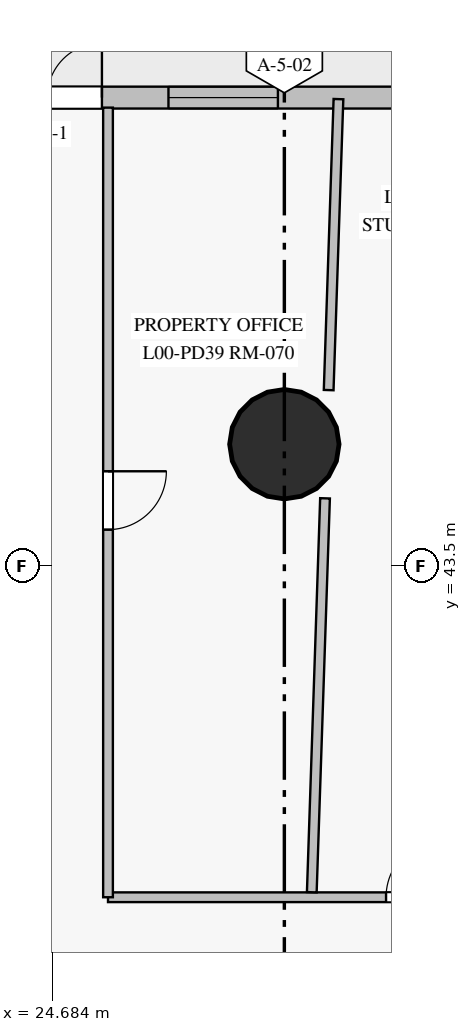
"""IFC4 building model, lengths in metres.
Left out: names, types, materials, properties, quantities, classifications, styles, units other than length and angle.
Written with IfcOpenShell. Run it as: python <this file> out.ifc"""

import sys

from ifc_helpers import new_model, si_unit, direction, frame, frame_2d, origin, origin_with_axes, origin_2d, place, context, subcontext, project, spatial, rectangle, circle, extrude, source, transform, mapped, element, fill, save


model = new_model("IFC4")
c1 = context("Model", 3, precision=1e-05, world=origin(), true_north=direction((0.0, 1.0)))
c2 = subcontext(c1, "Body", "Model", "MODEL_VIEW")
j1 = project(units=[si_unit("LENGTHUNIT", "METRE"), si_unit("PLANEANGLEUNIT", "RADIAN")], contexts=[c1])
p1 = place(None, origin())
s1 = spatial("IfcSite", under=j1, at=p1, CompositionType="ELEMENT")
p2 = place(p1, origin())
s2 = spatial("IfcBuilding", under=s1, at=p2, CompositionType="ELEMENT")
p3 = place(p2, origin())
s3 = spatial("IfcBuildingStorey", under=s2, at=p3, CompositionType="ELEMENT", Elevation=0.0)
m1 = source(origin_with_axes(), c2, "Body", "SweptSolid", [
    extrude(circle(Radius=0.9, at=origin_2d()), origin(), (0.0, 0.0, 1.0), 4.5),
])
p4 = place(p3, frame((28.5, 45.5, 0.0), z_axis=(0.0, 0.0, 1.0), x_axis=(1.0, 0.0, 0.0)))
e1 = element("IfcColumn", 1, at=p4, inside=s3, PredefinedType="COLUMN", context=c2, shape_type="MappedRepresentation", body=[
    mapped(m1, transform((0.0, 0.0, 0.0), scale=1.0)),
])
p5 = place(p3, frame((1.5, 51.2, 0.0), z_axis=(0.0, 0.0, 1.0), x_axis=(1.0, 0.0, 0.0)))
e2 = element("IfcWall", 2, at=p5, inside=s3, PredefinedType="SOLIDWALL", context=c2, shape_type="SweptSolid", body=[
    extrude(rectangle(XDim=54.6, YDim=0.36, at=frame_2d((27.3, 0.0))), origin(), (0.0, 0.0, 1.0), 4.2),
])
p6 = place(p5, frame((51.007, 0.0, 0.85)))
e3 = element("IfcOpeningElement", 3, at=p6, cuts=e2, PredefinedType="OPENING", context=c2, shape_type="SweptSolid", body=[
    extrude(rectangle(XDim=1.8, YDim=2.2, at=frame_2d((0.9, 1.1))), frame((0.0, 0.19, 0.0), z_axis=(0.0, -1.0, 0.0), x_axis=(1.0, 0.0, 0.0)), (0.0, 0.0, 1.0), 0.38),
])
p7 = place(p5, frame((46.765, 0.0, 0.85)))
e4 = element("IfcOpeningElement", 4, at=p7, cuts=e2, PredefinedType="OPENING", context=c2, shape_type="SweptSolid", body=[
    extrude(rectangle(XDim=1.8, YDim=2.2, at=frame_2d((0.9, 1.1))), frame((0.0, 0.19, 0.0), z_axis=(0.0, -1.0, 0.0), x_axis=(1.0, 0.0, 0.0)), (0.0, 0.0, 1.0), 0.38),
])
p8 = place(p5, frame((41.844, 0.0, 0.85)))
e5 = element("IfcOpeningElement", 5, at=p8, cuts=e2, PredefinedType="OPENING", context=c2, shape_type="SweptSolid", body=[
    extrude(rectangle(XDim=1.8, YDim=2.2, at=frame_2d((0.9, 1.1))), frame((0.0, 0.19, 0.0), z_axis=(0.0, -1.0, 0.0), x_axis=(1.0, 0.0, 0.0)), (0.0, 0.0, 1.0), 0.38),
])
p9 = place(p5, frame((36.894, 0.0, 0.85)))
e6 = element("IfcOpeningElement", 6, at=p9, cuts=e2, PredefinedType="OPENING", context=c2, shape_type="SweptSolid", body=[
    extrude(rectangle(XDim=1.8, YDim=2.2, at=frame_2d((0.9, 1.1))), frame((0.0, 0.19, 0.0), z_axis=(0.0, -1.0, 0.0), x_axis=(1.0, 0.0, 0.0)), (0.0, 0.0, 1.0), 0.38),
])
p10 = place(p5, frame((29.542, 0.0, 0.85)))
e7 = element("IfcOpeningElement", 7, at=p10, cuts=e2, PredefinedType="OPENING", context=c2, shape_type="SweptSolid", body=[
    extrude(rectangle(XDim=1.8, YDim=2.2, at=frame_2d((0.9, 1.1))), frame((0.0, 0.19, 0.0), z_axis=(0.0, -1.0, 0.0), x_axis=(1.0, 0.0, 0.0)), (0.0, 0.0, 1.0), 0.38),
])
p11 = place(p5, frame((25.094, 0.0, 0.85)))
e8 = element("IfcOpeningElement", 8, at=p11, cuts=e2, PredefinedType="OPENING", context=c2, shape_type="SweptSolid", body=[
    extrude(rectangle(XDim=1.8, YDim=2.2, at=frame_2d((0.9, 1.1))), frame((0.0, 0.19, 0.0), z_axis=(0.0, -1.0, 0.0), x_axis=(1.0, 0.0, 0.0)), (0.0, 0.0, 1.0), 0.38),
])
p12 = place(p5, frame((11.445, 0.0, 0.85)))
e9 = element("IfcOpeningElement", 9, at=p12, cuts=e2, PredefinedType="OPENING", context=c2, shape_type="SweptSolid", body=[
    extrude(rectangle(XDim=1.8, YDim=2.2, at=frame_2d((0.9, 1.1))), frame((0.0, 0.19, 0.0), z_axis=(0.0, -1.0, 0.0), x_axis=(1.0, 0.0, 0.0)), (0.0, 0.0, 1.0), 0.38),
])
p13 = place(p5, frame((2.908, 0.0, 0.85)))
e10 = element("IfcOpeningElement", 10, at=p13, cuts=e2, PredefinedType="OPENING", context=c2, shape_type="SweptSolid", body=[
    extrude(rectangle(XDim=1.8, YDim=2.2, at=frame_2d((0.9, 1.1))), frame((0.0, 0.19, 0.0), z_axis=(0.0, -1.0, 0.0), x_axis=(1.0, 0.0, 0.0)), (0.0, 0.0, 1.0), 0.38),
])
p14 = place(p5, frame((19.6, 0.0, 0.0)))
e11 = element("IfcOpeningElement", 11, at=p14, cuts=e2, PredefinedType="OPENING", context=c2, shape_type="SweptSolid", body=[
    extrude(rectangle(XDim=1.8, YDim=2.3, at=frame_2d((0.9, 1.15))), frame((0.0, 0.19, 0.0), z_axis=(0.0, -1.0, 0.0), x_axis=(1.0, 0.0, 0.0)), (0.0, 0.0, 1.0), 0.38),
])
p15 = place(p5, frame((22.2, 0.0, 0.0)))
e12 = element("IfcOpeningElement", 12, at=p15, cuts=e2, PredefinedType="OPENING", context=c2, shape_type="SweptSolid", body=[
    extrude(rectangle(XDim=1.8, YDim=2.3, at=frame_2d((0.9, 1.15))), frame((0.0, 0.19, 0.0), z_axis=(0.0, -1.0, 0.0), x_axis=(1.0, 0.0, 0.0)), (0.0, 0.0, 1.0), 0.38),
])
p16 = place(p5, frame((15.5, 0.0, 0.0)))
e13 = element("IfcOpeningElement", 13, at=p16, cuts=e2, PredefinedType="OPENING", context=c2, shape_type="SweptSolid", body=[
    extrude(rectangle(XDim=1.8, YDim=2.3, at=frame_2d((0.9, 1.15))), frame((0.0, 0.19, 0.0), z_axis=(0.0, -1.0, 0.0), x_axis=(1.0, 0.0, 0.0)), (0.0, 0.0, 1.0), 0.38),
])
p17 = place(p3, frame((25.6, 38.05, 0.0), z_axis=(0.0, 0.0, 1.0), x_axis=(1.0, 0.0, 0.0)))
e14 = element("IfcWall", 14, at=p17, inside=s3, PredefinedType="PARTITIONING", context=c2, shape_type="SweptSolid", body=[
    extrude(rectangle(XDim=15.25, YDim=0.16, at=frame_2d((7.625, 0.0))), origin(), (0.0, 0.0, 1.0), 4.2),
])
p18 = place(p17, frame((9.677, 0.0, 0.0)))
e15 = element("IfcOpeningElement", 15, at=p18, cuts=e14, PredefinedType="OPENING", context=c2, shape_type="SweptSolid", body=[
    extrude(rectangle(XDim=0.96, YDim=2.15, at=frame_2d((0.48, 1.075))), frame((0.0, 0.09, 0.0), z_axis=(0.0, -1.0, 0.0), x_axis=(1.0, 0.0, 0.0)), (0.0, 0.0, 1.0), 0.18),
])
p19 = place(p17, frame((7.15, 0.0, 0.0)))
e16 = element("IfcOpeningElement", 16, at=p19, cuts=e14, PredefinedType="OPENING", context=c2, shape_type="SweptSolid", body=[
    extrude(rectangle(XDim=0.96, YDim=2.15, at=frame_2d((0.48, 1.075))), frame((0.0, 0.09, 0.0), z_axis=(0.0, -1.0, 0.0), x_axis=(1.0, 0.0, 0.0)), (0.0, 0.0, 1.0), 0.18),
])
p20 = place(p17, frame((4.573, 0.0, 0.0)))
e17 = element("IfcOpeningElement", 17, at=p20, cuts=e14, PredefinedType="OPENING", context=c2, shape_type="SweptSolid", body=[
    extrude(rectangle(XDim=0.96, YDim=2.15, at=frame_2d((0.48, 1.075))), frame((0.0, 0.09, 0.0), z_axis=(0.0, -1.0, 0.0), x_axis=(1.0, 0.0, 0.0)), (0.0, 0.0, 1.0), 0.18),
])
p21 = place(p3, frame((25.6, 51.035, 0.0), z_axis=(0.0, 0.0, 1.0), x_axis=(0.0, -1.0, 0.0)))
e18 = element("IfcWall", 18, at=p21, inside=s3, PredefinedType="PARTITIONING", context=c2, shape_type="SweptSolid", body=[
    extrude(rectangle(XDim=12.985, YDim=0.16, at=frame_2d((6.492, 0.0))), origin(), (0.0, 0.0, 1.0), 4.2),
])
p22 = place(p21, frame((5.98, 0.0, 0.0)))
e19 = element("IfcOpeningElement", 19, at=p22, cuts=e18, PredefinedType="OPENING", context=c2, shape_type="SweptSolid", body=[
    extrude(rectangle(XDim=0.96, YDim=2.15, at=frame_2d((0.48, 1.075))), frame((0.0, 0.09, 0.0), z_axis=(0.0, -1.0, 0.0), x_axis=(1.0, 0.0, 0.0)), (0.0, 0.0, 1.0), 0.18),
])
p23 = place(p3, frame((28.951, 38.132, 0.0), z_axis=(0.0, 0.0, 1.0), x_axis=(0.033598266136, 0.99943541888, 0.0)))
e20 = element("IfcWall", 20, at=p23, inside=s3, PredefinedType="PARTITIONING", context=c2, shape_type="SweptSolid", body=[
    extrude(rectangle(XDim=6.482, YDim=0.16, at=frame_2d((3.241, 0.0))), origin(), (0.0, 0.0, 1.0), 4.2),
])
p24 = place(p3, frame((29.229, 46.39, 0.0), z_axis=(0.0, 0.0, 1.0), x_axis=(0.033603460508, 0.999435244246, 0.0)))
e21 = element("IfcWall", 21, at=p24, inside=s3, PredefinedType="PARTITIONING", context=c2, shape_type="SweptSolid", body=[
    extrude(rectangle(XDim=4.788, YDim=0.16, at=frame_2d((2.394, 0.0))), origin(), (0.0, 0.0, 1.0), 4.2),
])
m2 = source(origin_with_axes(), c2, "Body", "SweptSolid", [
    extrude(rectangle(XDim=1.8, YDim=2.2, at=frame_2d((0.9, 1.1))), frame((0.0, 0.03, 0.0), z_axis=(0.0, -1.0, 0.0), x_axis=(1.0, 0.0, 0.0)), (0.0, 0.0, 1.0), 0.06),
])
p25 = place(p11, origin())
e22 = element("IfcWindow", 22, at=p25, inside=s3, PartitioningType="SINGLE_PANEL", PredefinedType="WINDOW", context=c2, shape_type="MappedRepresentation", body=[
    mapped(m2, transform((0.0, 0.0, 0.0), scale=1.0)),
])
fill(e8, e22)
m3 = source(origin_with_axes(), c2, "Body", "SweptSolid", [
    extrude(rectangle(XDim=1.8, YDim=2.3, at=frame_2d((0.9, 1.15))), frame((0.0, 0.025, 0.0), z_axis=(0.0, -1.0, 0.0), x_axis=(1.0, 0.0, 0.0)), (0.0, 0.0, 1.0), 0.05),
])
p26 = place(p15, origin())
e23 = element("IfcDoor", 23, at=p26, inside=s3, OperationType="DOUBLE_DOOR_SINGLE_SWING", PredefinedType="DOOR", context=c2, shape_type="MappedRepresentation", body=[
    mapped(m3, transform((0.0, 0.0, 0.0), scale=1.0)),
])
fill(e12, e23)
m4 = source(origin_with_axes(), c2, "Body", "SweptSolid", [
    extrude(rectangle(XDim=0.96, YDim=2.15, at=frame_2d((0.48, 1.075))), frame((0.0, 0.025, 0.0), z_axis=(0.0, -1.0, 0.0), x_axis=(1.0, 0.0, 0.0)), (0.0, 0.0, 1.0), 0.05),
])
p27 = place(p20, origin())
e24 = element("IfcDoor", 24, at=p27, inside=s3, OperationType="SINGLE_SWING_RIGHT", PredefinedType="DOOR", context=c2, shape_type="MappedRepresentation", body=[
    mapped(m4, transform((0.0, 0.0, 0.0), scale=1.0)),
])
fill(e17, e24)
p28 = place(p22, origin())
e25 = element("IfcDoor", 25, at=p28, inside=s3, OperationType="SINGLE_SWING_LEFT", PredefinedType="DOOR", context=c2, shape_type="MappedRepresentation", body=[
    mapped(m4, transform((0.0, 0.0, 0.0), scale=1.0)),
])
fill(e19, e25)
save(model, sys.argv[1])
